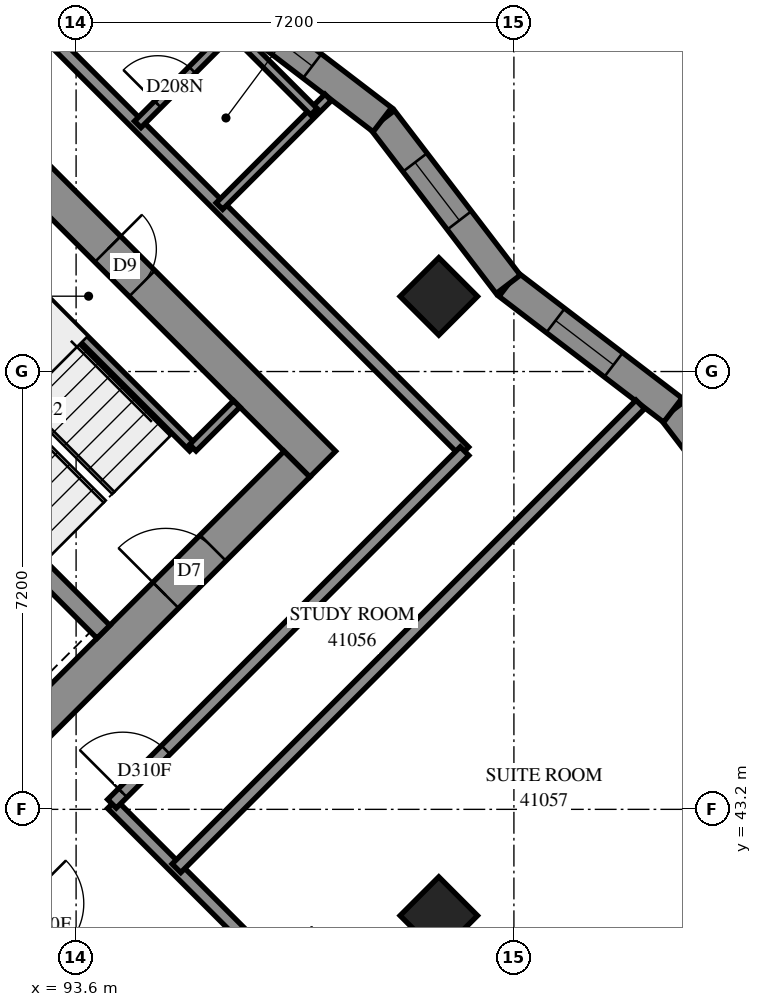
"""IFC4 building model, lengths in metres.
Left out: names, types, materials, properties, quantities, classifications, styles, units other than length and angle.
Written with IfcOpenShell. Run it as: python <this file> out.ifc"""

import sys

from ifc_helpers import new_model, si_unit, direction, frame, frame_2d, origin, origin_2d, place, context, subcontext, project, spatial, polyline, rectangle, outline, extrude, element, fill, save


model = new_model("IFC4")
c1 = context("Model", 3, precision=1e-05, world=origin(), true_north=direction((0.0, 1.0)))
c2 = subcontext(c1, "Body", "Model", "MODEL_VIEW")
j1 = project(units=[si_unit("LENGTHUNIT", "METRE"), si_unit("PLANEANGLEUNIT", "RADIAN")], contexts=[c1])
p1 = place(None, origin())
s1 = spatial("IfcSite", under=j1, at=p1, CompositionType="ELEMENT")
p2 = place(p1, origin())
s2 = spatial("IfcBuilding", under=s1, at=p2, CompositionType="ELEMENT")
p3 = place(p2, frame((0.0, 0.0, 152.4)))
s3 = spatial("IfcBuildingStorey", under=s2, at=p3, CompositionType="ELEMENT", Elevation=152.4)
for number, where, z_axis, x_axis in (
    (1, (99.565, 51.635, 0.0), (0.0, 0.0, 1.0), (0.707, -0.707, 0.0)),
    (2, (99.565, 41.453, 0.0), (0.0, 0.0, 1.0), (0.707, -0.707, 0.0)),
):
    element("IfcColumn", number, at=place(p3, frame(where, z_axis=z_axis, x_axis=x_axis)), inside=s3, PredefinedType="COLUMN", context=c2, shape_type="SweptSolid", body=[
        extrude(rectangle(XDim=0.9, YDim=0.9, at=origin_2d()), origin(), (0.0, 0.0, 1.0), 3.1),
    ])
p4 = place(p3, frame((86.625, 59.908, -0.3), z_axis=(0.0, 0.0, 1.0), x_axis=(0.7071067812, -0.7071067812, 0.0)))
e3 = element("IfcWall", 3, at=p4, inside=s3, PredefinedType="SHEAR", context=c2, shape_type="SweptSolid", body=[
    extrude(rectangle(XDim=15.6, YDim=0.6, at=frame_2d((7.8, 0.0))), origin(), (0.0, 0.0, 1.0), 2.7),
])
p5 = place(p4, frame((10.6, 0.0, 0.3)))
e4 = element("IfcOpeningElement", 4, at=p5, cuts=e3, PredefinedType="OPENING", context=c2, shape_type="SweptSolid", body=[
    extrude(rectangle(XDim=0.8, YDim=2.1, at=frame_2d((0.4, 1.05))), frame((0.0, 0.31, 0.0), z_axis=(0.0, -1.0, 0.0), x_axis=(1.0, 0.0, 0.0)), (0.0, 0.0, 1.0), 0.62),
])
p6 = place(p3, frame((87.049, 38.695, -0.3), z_axis=(0.0, 0.0, 1.0), x_axis=(0.7071067812, 0.7071067812, 0.0)))
e5 = element("IfcWall", 5, at=p6, inside=s3, PredefinedType="SHEAR", context=c2, shape_type="SweptSolid", body=[
    extrude(rectangle(XDim=14.4, YDim=0.6, at=frame_2d((7.2, 0.0))), origin(), (0.0, 0.0, 1.0), 2.7),
])
p7 = place(p6, frame((4.55, 0.0, 0.3)))
e6 = element("IfcOpeningElement", 6, at=p7, cuts=e5, PredefinedType="OPENING", context=c2, shape_type="SweptSolid", body=[
    extrude(rectangle(XDim=1.1, YDim=2.1, at=frame_2d((0.55, 1.05))), frame((0.0, 0.31, 0.0), z_axis=(0.0, -1.0, 0.0), x_axis=(1.0, 0.0, 0.0)), (0.0, 0.0, 1.0), 0.62),
])
p8 = place(p6, frame((11.35, 0.0, 0.3)))
e7 = element("IfcOpeningElement", 7, at=p8, cuts=e5, PredefinedType="OPENING", context=c2, shape_type="SweptSolid", body=[
    extrude(rectangle(XDim=1.1, YDim=2.1, at=frame_2d((0.55, 1.05))), frame((0.0, 0.31, 0.0), z_axis=(0.0, -1.0, 0.0), x_axis=(1.0, 0.0, 0.0)), (0.0, 0.0, 1.0), 0.62),
])
p9 = place(p3, frame((88.958, 51.211, 0.0), z_axis=(0.0, 0.0, 1.0), x_axis=(0.7070998367, -0.7071137256, 0.0)))
e8 = element("IfcWall", 8, at=p9, inside=s3, PredefinedType="SOLIDWALL", context=c2, shape_type="SweptSolid", body=[
    extrude(rectangle(XDim=7.2, YDim=0.3, at=frame_2d((3.6, 0.0))), origin(), (0.0, 0.0, 1.0), 3.1),
])
p10 = place(p3, frame((105.496, 47.04, 0.0), z_axis=(0.0, 0.0, 1.0), x_axis=(-0.6072996528, 0.7944728641, 0.0)))
e9 = element("IfcWall", 9, at=p10, inside=s3, PredefinedType="SOLIDWALL", context=c2, shape_type="SweptSolid", body=[
    extrude(outline(polyline([(0.055, -0.25), (3.463, -0.25), (3.396, 0.25), (-0.055, 0.25), (0.055, -0.25)])), origin(), (0.0, 0.0, 1.0), 3.1),
])
p11 = place(p10, frame((1.098, 0.0, 0.45)))
e10 = element("IfcOpeningElement", 10, at=p11, cuts=e9, PredefinedType="OPENING", context=c2, shape_type="SweptSolid", body=[
    extrude(rectangle(XDim=1.2, YDim=2.5, at=frame_2d((0.6, 1.25))), frame((0.0, 0.26, 0.0), z_axis=(0.0, -1.0, 0.0), x_axis=(1.0, 0.0, 0.0)), (0.0, 0.0, 1.0), 0.52),
])
p12 = place(p3, frame((103.414, 49.764, 0.0), z_axis=(0.0, 0.0, 1.0), x_axis=(-0.7944694348, 0.6073041389, 0.0)))
e11 = element("IfcWall", 11, at=p12, inside=s3, PredefinedType="SOLIDWALL", context=c2, shape_type="SweptSolid", body=[
    extrude(outline(polyline([(-0.033, -0.25), (3.374, -0.25), (3.441, 0.25), (0.033, 0.25), (-0.033, -0.25)])), origin(), (0.0, 0.0, 1.0), 3.1),
])
p13 = place(p12, frame((1.228, 0.0, 0.45)))
e12 = element("IfcOpeningElement", 12, at=p13, cuts=e11, PredefinedType="OPENING", context=c2, shape_type="SweptSolid", body=[
    extrude(rectangle(XDim=1.2, YDim=2.5, at=frame_2d((0.6, 1.25))), frame((0.0, 0.26, 0.0), z_axis=(0.0, -1.0, 0.0), x_axis=(1.0, 0.0, 0.0)), (0.0, 0.0, 1.0), 0.52),
])
p14 = place(p3, frame((100.707, 51.834, 0.0), z_axis=(0.0, 0.0, 1.0), x_axis=(-0.6073041389, 0.7944694348, 0.0)))
e13 = element("IfcWall", 13, at=p14, inside=s3, PredefinedType="SOLIDWALL", context=c2, shape_type="SweptSolid", body=[
    extrude(outline(polyline([(0.033, -0.25), (3.441, -0.25), (3.374, 0.25), (-0.033, 0.25), (0.033, -0.25)])), origin(), (0.0, 0.0, 1.0), 3.1),
])
p15 = place(p14, frame((1.324, 0.0, 0.45)))
e14 = element("IfcOpeningElement", 14, at=p15, cuts=e13, PredefinedType="OPENING", context=c2, shape_type="SweptSolid", body=[
    extrude(rectangle(XDim=1.2, YDim=2.5, at=frame_2d((0.6, 1.25))), frame((0.0, 0.26, 0.0), z_axis=(0.0, -1.0, 0.0), x_axis=(1.0, 0.0, 0.0)), (0.0, 0.0, 1.0), 0.52),
])
p16 = place(p3, frame((98.637, 54.541, 0.0), z_axis=(0.0, 0.0, 1.0), x_axis=(-0.7944694348, 0.6073041389, 0.0)))
e15 = element("IfcWall", 15, at=p16, inside=s3, PredefinedType="SOLIDWALL", context=c2, shape_type="SweptSolid", body=[
    extrude(outline(polyline([(-0.033, -0.25), (3.374, -0.25), (3.441, 0.25), (0.033, 0.25), (-0.033, -0.25)])), origin(), (0.0, 0.0, 1.0), 3.1),
])
p17 = place(p16, frame((1.452, 0.0, 0.45)))
e16 = element("IfcOpeningElement", 16, at=p17, cuts=e15, PredefinedType="OPENING", context=c2, shape_type="SweptSolid", body=[
    extrude(rectangle(XDim=1.2, YDim=2.5, at=frame_2d((0.6, 1.25))), frame((0.0, 0.26, 0.0), z_axis=(0.0, -1.0, 0.0), x_axis=(1.0, 0.0, 0.0)), (0.0, 0.0, 1.0), 0.52),
])
p18 = place(p3, frame((91.313, 53.354, 0.0), z_axis=(0.0, 0.0, 1.0), x_axis=(0.7071067812, -0.7071067812, 0.0)))
e17 = element("IfcWall", 17, at=p18, inside=s3, PredefinedType="PARTITIONING", context=c2, shape_type="SweptSolid", body=[
    extrude(rectangle(XDim=5.95, YDim=0.15, at=frame_2d((2.975, 0.0))), origin(), (0.0, 0.0, 1.0), 3.1),
])
p19 = place(p3, frame((95.52, 49.146, 0.0), z_axis=(0.0, 0.0, 1.0), x_axis=(0.7071067812, 0.7071067812, 0.0)))
e18 = element("IfcWall", 18, at=p19, inside=s3, PredefinedType="PARTITIONING", context=c2, shape_type="SweptSolid", body=[
    extrude(rectangle(XDim=1.02, YDim=0.15, at=frame_2d((0.51, 0.0))), origin(), (0.0, 0.0, 1.0), 3.1),
])
p20 = place(p3, frame((94.189, 43.287, 0.0), z_axis=(0.0, 0.0, 1.0), x_axis=(0.7071067812, -0.7071067812, 0.0)))
e19 = element("IfcWall", 19, at=p20, inside=s3, PredefinedType="PARTITIONING", context=c2, shape_type="SweptSolid", body=[
    extrude(rectangle(XDim=12.298, YDim=0.2, at=frame_2d((6.149, 0.0))), origin(), (0.0, 0.0, 1.0), 3.1),
])
p21 = place(p20, frame((3.755, 0.0, 0.0)))
e20 = element("IfcOpeningElement", 20, at=p21, cuts=e19, PredefinedType="OPENING", context=c2, shape_type="SweptSolid", body=[
    extrude(rectangle(XDim=0.9, YDim=2.1, at=frame_2d((0.45, 1.05))), frame((0.0, 0.11, 0.0), z_axis=(0.0, -1.0, 0.0), x_axis=(1.0, 0.0, 0.0)), (0.0, 0.0, 1.0), 0.22),
])
p22 = place(p20, frame((10.998, 0.0, 0.0)))
e21 = element("IfcOpeningElement", 21, at=p22, cuts=e19, PredefinedType="OPENING", context=c2, shape_type="SweptSolid", body=[
    extrude(rectangle(XDim=0.9, YDim=2.1, at=frame_2d((0.45, 1.05))), frame((0.0, 0.11, 0.0), z_axis=(0.0, -1.0, 0.0), x_axis=(1.0, 0.0, 0.0)), (0.0, 0.0, 1.0), 0.22),
])
p23 = place(p3, frame((91.755, 57.317, 0.0), z_axis=(0.0, 0.0, 1.0), x_axis=(0.7071067812, -0.7071067812, 0.0)))
e22 = element("IfcWall", 22, at=p23, inside=s3, PredefinedType="PARTITIONING", context=c2, shape_type="SweptSolid", body=[
    extrude(rectangle(XDim=11.639, YDim=0.2, at=frame_2d((5.819, 0.0))), origin(), (0.0, 0.0, 1.0), 3.1),
])
p24 = place(p3, frame((95.25, 42.232, 0.0), z_axis=(0.0, 0.0, 1.0), x_axis=(0.7071114163, 0.707102146, 0.0)))
e23 = element("IfcWall", 23, at=p24, inside=s3, PredefinedType="PARTITIONING", context=c2, shape_type="SweptSolid", body=[
    extrude(rectangle(XDim=10.787, YDim=0.2, at=frame_2d((5.394, 0.0))), origin(), (0.0, 0.0, 1.0), 3.1),
])
p25 = place(p3, frame((94.19, 43.292, 0.0), z_axis=(0.0, 0.0, 1.0), x_axis=(0.7071067812, 0.7071067812, 0.0)))
e24 = element("IfcWall", 24, at=p25, inside=s3, PredefinedType="PARTITIONING", context=c2, shape_type="SweptSolid", body=[
    extrude(rectangle(XDim=8.2, YDim=0.2, at=frame_2d((4.1, 0.0))), origin(), (0.0, 0.0, 1.0), 3.1),
])
p26 = place(p25, frame((0.251, 0.0, 0.0)))
e25 = element("IfcOpeningElement", 25, at=p26, cuts=e24, PredefinedType="OPENING", context=c2, shape_type="SweptSolid", body=[
    extrude(rectangle(XDim=1.0, YDim=2.1, at=frame_2d((0.5, 1.05))), frame((0.0, 0.11, 0.0), z_axis=(0.0, -1.0, 0.0), x_axis=(1.0, 0.0, 0.0)), (0.0, 0.0, 1.0), 0.22),
])
p27 = place(p3, frame((92.639, 41.739, 0.0), z_axis=(0.0, 0.0, 1.0), x_axis=(0.7071067812, -0.7071067812, 0.0)))
e26 = element("IfcWall", 26, at=p27, inside=s3, PredefinedType="PARTITIONING", context=c2, shape_type="SweptSolid", body=[
    extrude(rectangle(XDim=5.1, YDim=0.2, at=frame_2d((2.55, 0.0))), origin(), (0.0, 0.0, 1.0), 3.1),
])
p28 = place(p27, frame((0.123, 0.0, 0.0)))
e27 = element("IfcOpeningElement", 27, at=p28, cuts=e26, PredefinedType="OPENING", context=c2, shape_type="SweptSolid", body=[
    extrude(rectangle(XDim=1.0, YDim=2.1, at=frame_2d((0.5, 1.05))), frame((0.0, 0.11, 0.0), z_axis=(0.0, -1.0, 0.0), x_axis=(1.0, 0.0, 0.0)), (0.0, 0.0, 1.0), 0.22),
])
p29 = place(p27, frame((3.734, 0.0, 0.0)))
e28 = element("IfcOpeningElement", 28, at=p29, cuts=e26, PredefinedType="OPENING", context=c2, shape_type="SweptSolid", body=[
    extrude(rectangle(XDim=0.9, YDim=2.1, at=frame_2d((0.45, 1.05))), frame((0.0, 0.11, 0.0), z_axis=(0.0, -1.0, 0.0), x_axis=(1.0, 0.0, 0.0)), (0.0, 0.0, 1.0), 0.22),
])
p30 = place(p3, frame((95.957, 53.121, 0.0), z_axis=(0.0, 0.0, 1.0), x_axis=(0.7071067812, 0.7071067812, 0.0)))
e29 = element("IfcWall", 29, at=p30, inside=s3, PredefinedType="PARTITIONING", context=c2, shape_type="SweptSolid", body=[
    extrude(rectangle(XDim=2.528, YDim=0.15, at=frame_2d((1.264, 0.0))), origin(), (0.0, 0.0, 1.0), 3.1),
])
p31 = place(p3, frame((94.614, 54.464, 0.0), z_axis=(0.0, 0.0, 1.0), x_axis=(0.7071067812, 0.7071067812, 0.0)))
e30 = element("IfcWall", 30, at=p31, inside=s3, PredefinedType="PARTITIONING", context=c2, shape_type="SweptSolid", body=[
    extrude(rectangle(XDim=2.275, YDim=0.15, at=frame_2d((1.137, 0.0))), origin(), (0.0, 0.0, 1.0), 3.1),
])
p32 = place(p31, frame((0.466, 0.0, 0.0)))
e31 = element("IfcOpeningElement", 31, at=p32, cuts=e30, PredefinedType="OPENING", context=c2, shape_type="SweptSolid", body=[
    extrude(rectangle(XDim=0.8, YDim=2.1, at=frame_2d((0.4, 1.05))), frame((0.0, 0.085, 0.0), z_axis=(0.0, -1.0, 0.0), x_axis=(1.0, 0.0, 0.0)), (0.0, 0.0, 1.0), 0.17),
])
p33 = place(p3, frame((96.203, 55.981, 0.0), z_axis=(0.0, 0.0, 1.0), x_axis=(0.7071067812, -0.7071067812, 0.0)))
e32 = element("IfcWall", 32, at=p33, inside=s3, PredefinedType="PARTITIONING", context=c2, shape_type="SweptSolid", body=[
    extrude(rectangle(XDim=1.85, YDim=0.15, at=frame_2d((0.925, 0.0))), origin(), (0.0, 0.0, 1.0), 3.1),
])
p34 = place(p13, origin())
e33 = element("IfcWindow", 33, at=p34, inside=s3, PartitioningType="SINGLE_PANEL", PredefinedType="WINDOW", context=c2, shape_type="SweptSolid", body=[
    extrude(rectangle(XDim=1.2, YDim=2.5, at=frame_2d((0.6, 1.25))), frame((0.0, 0.18, 0.0), z_axis=(0.0, -1.0, 0.0), x_axis=(1.0, 0.0, 0.0)), (0.0, 0.0, 1.0), 0.06),
])
fill(e12, e33)
p35 = place(p15, origin())
e34 = element("IfcWindow", 34, at=p35, inside=s3, PartitioningType="SINGLE_PANEL", PredefinedType="WINDOW", context=c2, shape_type="SweptSolid", body=[
    extrude(rectangle(XDim=1.2, YDim=2.5, at=frame_2d((0.6, 1.25))), frame((0.0, 0.18, 0.0), z_axis=(0.0, -1.0, 0.0), x_axis=(1.0, 0.0, 0.0)), (0.0, 0.0, 1.0), 0.06),
])
fill(e14, e34)
p36 = place(p17, origin())
e35 = element("IfcWindow", 35, at=p36, inside=s3, PartitioningType="SINGLE_PANEL", PredefinedType="WINDOW", context=c2, shape_type="SweptSolid", body=[
    extrude(rectangle(XDim=1.2, YDim=2.5, at=frame_2d((0.6, 1.25))), frame((0.0, 0.18, 0.0), z_axis=(0.0, -1.0, 0.0), x_axis=(1.0, 0.0, 0.0)), (0.0, 0.0, 1.0), 0.06),
])
fill(e16, e35)
p37 = place(p5, origin())
e36 = element("IfcDoor", 36, at=p37, inside=s3, OperationType="SINGLE_SWING_RIGHT", PredefinedType="DOOR", context=c2, shape_type="SweptSolid", body=[
    extrude(rectangle(XDim=0.8, YDim=2.1, at=frame_2d((0.4, 1.05))), frame((0.0, 0.025, 0.0), z_axis=(0.0, -1.0, 0.0), x_axis=(1.0, 0.0, 0.0)), (0.0, 0.0, 1.0), 0.05),
])
fill(e4, e36)
p38 = place(p8, origin())
e37 = element("IfcDoor", 37, at=p38, inside=s3, OperationType="SINGLE_SWING_RIGHT", PredefinedType="DOOR", context=c2, shape_type="SweptSolid", body=[
    extrude(rectangle(XDim=1.1, YDim=2.1, at=frame_2d((0.55, 1.05))), frame((0.0, 0.025, 0.0), z_axis=(0.0, -1.0, 0.0), x_axis=(1.0, 0.0, 0.0)), (0.0, 0.0, 1.0), 0.05),
])
fill(e7, e37)
p39 = place(p26, origin())
e38 = element("IfcDoor", 38, at=p39, inside=s3, OperationType="SINGLE_SWING_RIGHT", PredefinedType="DOOR", context=c2, shape_type="SweptSolid", body=[
    extrude(rectangle(XDim=1.0, YDim=2.1, at=frame_2d((0.5, 1.05))), frame((0.0, 0.025, 0.0), z_axis=(0.0, -1.0, 0.0), x_axis=(1.0, 0.0, 0.0)), (0.0, 0.0, 1.0), 0.05),
])
fill(e25, e38)
p40 = place(p32, origin())
e39 = element("IfcDoor", 39, at=p40, inside=s3, OperationType="SINGLE_SWING_RIGHT", PredefinedType="DOOR", context=c2, shape_type="SweptSolid", body=[
    extrude(rectangle(XDim=0.8, YDim=2.1, at=frame_2d((0.4, 1.05))), frame((0.0, 0.025, 0.0), z_axis=(0.0, -1.0, 0.0), x_axis=(1.0, 0.0, 0.0)), (0.0, 0.0, 1.0), 0.05),
])
fill(e31, e39)
p41 = place(p28, origin())
e40 = element("IfcDoor", 40, at=p41, inside=s3, OperationType="SINGLE_SWING_RIGHT", PredefinedType="DOOR", context=c2, shape_type="SweptSolid", body=[
    extrude(rectangle(XDim=1.0, YDim=2.1, at=frame_2d((0.5, 1.05))), frame((0.0, 0.025, 0.0), z_axis=(0.0, -1.0, 0.0), x_axis=(1.0, 0.0, 0.0)), (0.0, 0.0, 1.0), 0.05),
])
fill(e27, e40)
save(model, sys.argv[1])
